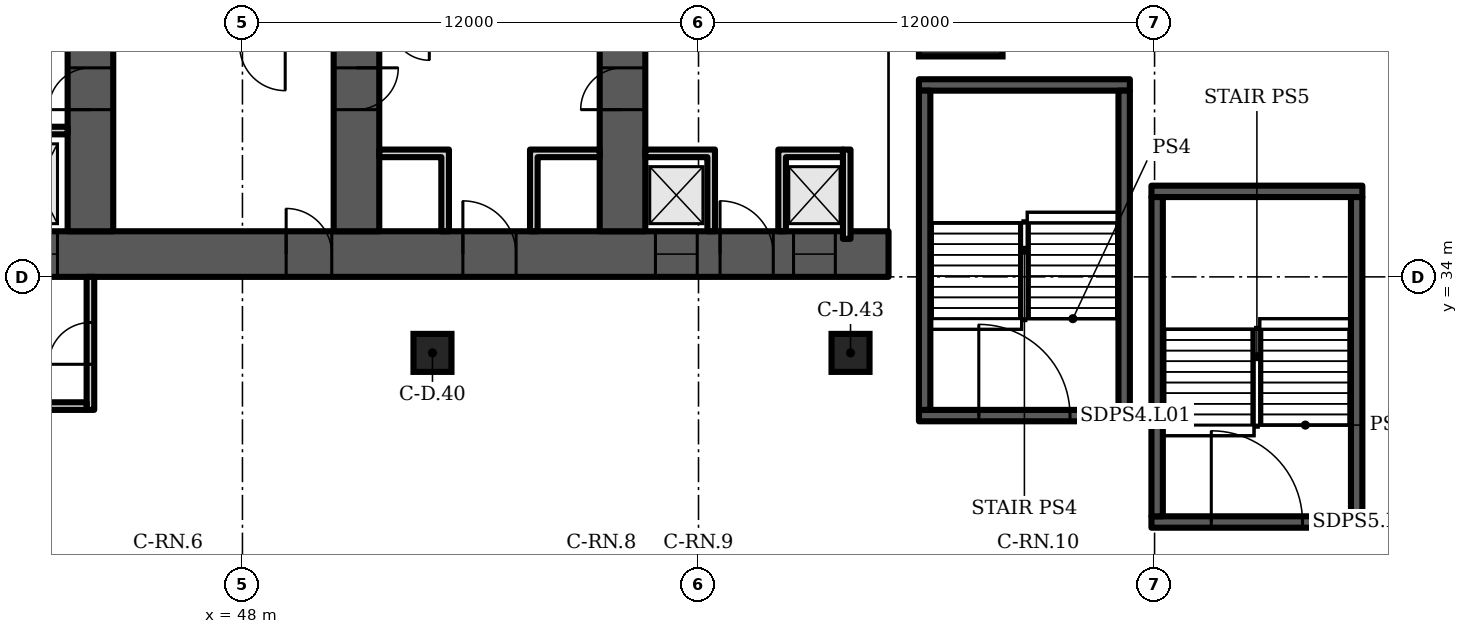
"""IFC4 building model, lengths in metres.
Left out: names, types, materials, properties, quantities, classifications, styles, units other than length and angle.
Written with IfcOpenShell. Run it as: python <this file> out.ifc"""

import sys

from ifc_helpers import new_model, si_unit, direction, frame, frame_2d, origin, origin_2d, place, context, subcontext, project, spatial, polyline, rectangle, outline, extrude, element, fill, save


model = new_model("IFC4")
c1 = context("Model", 3, precision=1e-05, world=origin(), true_north=direction((0.0, 1.0)))
c2 = subcontext(c1, "Body", "Model", "MODEL_VIEW")
j1 = project(units=[si_unit("LENGTHUNIT", "METRE"), si_unit("PLANEANGLEUNIT", "RADIAN")], contexts=[c1])
p1 = place(None, origin())
s1 = spatial("IfcSite", under=j1, at=p1, CompositionType="ELEMENT")
p2 = place(p1, origin())
s2 = spatial("IfcBuilding", under=s1, at=p2, CompositionType="ELEMENT")
p3 = place(p2, frame((0.0, 0.0, 8.0)))
s3 = spatial("IfcBuildingStorey", under=s2, at=p3, CompositionType="ELEMENT", Elevation=8.0)
p4 = place(p3, frame((66.9, 40.9, 0.0), z_axis=(0.0, 0.0, 1.0), x_axis=(1.0, 0.0, 0.0)))
e1 = element("IfcColumn", 1, at=p4, inside=s3, PredefinedType="COLUMN", context=c2, shape_type="SweptSolid", body=[
    extrude(rectangle(XDim=2.2, YDim=2.2, at=origin_2d()), origin(), (0.0, 0.0, 1.0), 7.0),
])
for number, where, z_axis, x_axis in (
    (2, (53.0, 32.0, 0.0), (0.0, 0.0, 1.0), (1.0, 0.0, 0.0)),
    (3, (64.0, 32.0, 0.0), (0.0, 0.0, 1.0), (1.0, 0.0, 0.0)),
):
    element("IfcColumn", number, at=place(p3, frame(where, z_axis=z_axis, x_axis=x_axis)), inside=s3, PredefinedType="COLUMN", context=c2, shape_type="SweptSolid", body=[
        extrude(rectangle(XDim=1.0, YDim=1.0, at=origin_2d()), origin(), (0.0, 0.0, 1.0), 7.0),
    ])
p5 = place(p3, frame((9.0, 34.6, 0.0), z_axis=(0.0, 0.0, 1.0), x_axis=(1.0, 0.0, 0.0)))
e4 = element("IfcWall", 4, at=p5, inside=s3, PredefinedType="SHEAR", context=c2, shape_type="SweptSolid", body=[
    extrude(rectangle(XDim=56.0, YDim=1.2, at=frame_2d((28.0, 0.0))), origin(), (0.0, 0.0, 1.0), 6.7),
])
p6 = place(p5, frame((2.0, 0.0, 0.0)))
e5 = element("IfcOpeningElement", 5, at=p6, cuts=e4, PredefinedType="OPENING", context=c2, shape_type="SweptSolid", body=[
    extrude(rectangle(XDim=1.0, YDim=2.1, at=frame_2d((0.5, 1.05))), frame((0.0, 0.61, 0.0), z_axis=(0.0, -1.0, 0.0), x_axis=(1.0, 0.0, 0.0)), (0.0, 0.0, 1.0), 1.22),
])
p7 = place(p5, frame((4.6, 0.0, 0.0)))
e6 = element("IfcOpeningElement", 6, at=p7, cuts=e4, PredefinedType="OPENING", context=c2, shape_type="SweptSolid", body=[
    extrude(rectangle(XDim=1.0, YDim=2.1, at=frame_2d((0.5, 1.05))), frame((0.0, 0.61, 0.0), z_axis=(0.0, -1.0, 0.0), x_axis=(1.0, 0.0, 0.0)), (0.0, 0.0, 1.0), 1.22),
])
p8 = place(p5, frame((7.867, 0.0, 0.0)))
e7 = element("IfcOpeningElement", 7, at=p8, cuts=e4, PredefinedType="OPENING", context=c2, shape_type="SweptSolid", body=[
    extrude(rectangle(XDim=1.1, YDim=2.1, at=frame_2d((0.55, 1.05))), frame((0.0, 0.61, 0.0), z_axis=(0.0, -1.0, 0.0), x_axis=(1.0, 0.0, 0.0)), (0.0, 0.0, 1.0), 1.22),
])
p9 = place(p5, frame((12.033, 0.0, 0.0)))
e8 = element("IfcOpeningElement", 8, at=p9, cuts=e4, PredefinedType="OPENING", context=c2, shape_type="SweptSolid", body=[
    extrude(rectangle(XDim=1.1, YDim=2.1, at=frame_2d((0.55, 1.05))), frame((0.0, 0.61, 0.0), z_axis=(0.0, -1.0, 0.0), x_axis=(1.0, 0.0, 0.0)), (0.0, 0.0, 1.0), 1.22),
])
p10 = place(p5, frame((9.8, 0.0, 0.0)))
e9 = element("IfcOpeningElement", 9, at=p10, cuts=e4, PredefinedType="OPENING", context=c2, shape_type="SweptSolid", body=[
    extrude(rectangle(XDim=1.4, YDim=2.1, at=frame_2d((0.7, 1.05))), frame((0.0, 0.61, 0.0), z_axis=(0.0, -1.0, 0.0), x_axis=(1.0, 0.0, 0.0)), (0.0, 0.0, 1.0), 1.22),
])
p11 = place(p5, frame((14.65, 0.0, 0.0)))
e10 = element("IfcOpeningElement", 10, at=p11, cuts=e4, PredefinedType="OPENING", context=c2, shape_type="SweptSolid", body=[
    extrude(rectangle(XDim=1.2, YDim=2.1, at=frame_2d((0.6, 1.05))), frame((0.0, 0.61, 0.0), z_axis=(0.0, -1.0, 0.0), x_axis=(1.0, 0.0, 0.0)), (0.0, 0.0, 1.0), 1.22),
])
p12 = place(p5, frame((21.867, 0.0, 0.0)))
e11 = element("IfcOpeningElement", 11, at=p12, cuts=e4, PredefinedType="OPENING", context=c2, shape_type="SweptSolid", body=[
    extrude(rectangle(XDim=1.1, YDim=2.1, at=frame_2d((0.55, 1.05))), frame((0.0, 0.61, 0.0), z_axis=(0.0, -1.0, 0.0), x_axis=(1.0, 0.0, 0.0)), (0.0, 0.0, 1.0), 1.22),
])
p13 = place(p5, frame((26.033, 0.0, 0.0)))
e12 = element("IfcOpeningElement", 12, at=p13, cuts=e4, PredefinedType="OPENING", context=c2, shape_type="SweptSolid", body=[
    extrude(rectangle(XDim=1.1, YDim=2.1, at=frame_2d((0.55, 1.05))), frame((0.0, 0.61, 0.0), z_axis=(0.0, -1.0, 0.0), x_axis=(1.0, 0.0, 0.0)), (0.0, 0.0, 1.0), 1.22),
])
p14 = place(p5, frame((23.8, 0.0, 0.0)))
e13 = element("IfcOpeningElement", 13, at=p14, cuts=e4, PredefinedType="OPENING", context=c2, shape_type="SweptSolid", body=[
    extrude(rectangle(XDim=1.4, YDim=2.1, at=frame_2d((0.7, 1.05))), frame((0.0, 0.61, 0.0), z_axis=(0.0, -1.0, 0.0), x_axis=(1.0, 0.0, 0.0)), (0.0, 0.0, 1.0), 1.22),
])
p15 = place(p5, frame((28.867, 0.0, 0.0)))
e14 = element("IfcOpeningElement", 14, at=p15, cuts=e4, PredefinedType="OPENING", context=c2, shape_type="SweptSolid", body=[
    extrude(rectangle(XDim=1.1, YDim=2.1, at=frame_2d((0.55, 1.05))), frame((0.0, 0.61, 0.0), z_axis=(0.0, -1.0, 0.0), x_axis=(1.0, 0.0, 0.0)), (0.0, 0.0, 1.0), 1.22),
])
p16 = place(p5, frame((33.033, 0.0, 0.0)))
e15 = element("IfcOpeningElement", 15, at=p16, cuts=e4, PredefinedType="OPENING", context=c2, shape_type="SweptSolid", body=[
    extrude(rectangle(XDim=1.1, YDim=2.1, at=frame_2d((0.55, 1.05))), frame((0.0, 0.61, 0.0), z_axis=(0.0, -1.0, 0.0), x_axis=(1.0, 0.0, 0.0)), (0.0, 0.0, 1.0), 1.22),
])
p17 = place(p5, frame((40.15, 0.0, 0.0)))
e16 = element("IfcOpeningElement", 16, at=p17, cuts=e4, PredefinedType="OPENING", context=c2, shape_type="SweptSolid", body=[
    extrude(rectangle(XDim=1.2, YDim=2.1, at=frame_2d((0.6, 1.05))), frame((0.0, 0.61, 0.0), z_axis=(0.0, -1.0, 0.0), x_axis=(1.0, 0.0, 0.0)), (0.0, 0.0, 1.0), 1.22),
])
p18 = place(p5, frame((44.8, 0.0, 0.0)))
e17 = element("IfcOpeningElement", 17, at=p18, cuts=e4, PredefinedType="OPENING", context=c2, shape_type="SweptSolid", body=[
    extrude(rectangle(XDim=1.4, YDim=2.1, at=frame_2d((0.7, 1.05))), frame((0.0, 0.61, 0.0), z_axis=(0.0, -1.0, 0.0), x_axis=(1.0, 0.0, 0.0)), (0.0, 0.0, 1.0), 1.22),
])
p19 = place(p5, frame((49.867, 0.0, 0.0)))
e18 = element("IfcOpeningElement", 18, at=p19, cuts=e4, PredefinedType="OPENING", context=c2, shape_type="SweptSolid", body=[
    extrude(rectangle(XDim=1.1, YDim=2.1, at=frame_2d((0.55, 1.05))), frame((0.0, 0.61, 0.0), z_axis=(0.0, -1.0, 0.0), x_axis=(1.0, 0.0, 0.0)), (0.0, 0.0, 1.0), 1.22),
])
p20 = place(p5, frame((53.5, 0.0, 0.0)))
e19 = element("IfcOpeningElement", 19, at=p20, cuts=e4, PredefinedType="OPENING", context=c2, shape_type="SweptSolid", body=[
    extrude(rectangle(XDim=1.1, YDim=2.1, at=frame_2d((0.55, 1.05))), frame((0.0, 0.61, 0.0), z_axis=(0.0, -1.0, 0.0), x_axis=(1.0, 0.0, 0.0)), (0.0, 0.0, 1.0), 1.22),
])
p21 = place(p5, frame((51.567, 0.0, 0.0)))
e20 = element("IfcOpeningElement", 20, at=p21, cuts=e4, PredefinedType="OPENING", context=c2, shape_type="SweptSolid", body=[
    extrude(rectangle(XDim=1.4, YDim=2.1, at=frame_2d((0.7, 1.05))), frame((0.0, 0.61, 0.0), z_axis=(0.0, -1.0, 0.0), x_axis=(1.0, 0.0, 0.0)), (0.0, 0.0, 1.0), 1.22),
])
p22 = place(p3, frame((44.0, 35.2, 0.0), z_axis=(0.0, 0.0, 1.0), x_axis=(0.0, 1.0, 0.0)))
e21 = element("IfcWall", 21, at=p22, inside=s3, PredefinedType="SHEAR", context=c2, shape_type="SweptSolid", body=[
    extrude(rectangle(XDim=12.8, YDim=1.2, at=frame_2d((6.4, 0.0))), origin(), (0.0, 0.0, 1.0), 6.7),
])
p23 = place(p22, frame((3.2, 0.0, 0.0)))
e22 = element("IfcOpeningElement", 22, at=p23, cuts=e21, PredefinedType="OPENING", context=c2, shape_type="SweptSolid", body=[
    extrude(rectangle(XDim=1.1, YDim=2.1, at=frame_2d((0.55, 1.05))), frame((0.0, 0.61, 0.0), z_axis=(0.0, -1.0, 0.0), x_axis=(1.0, 0.0, 0.0)), (0.0, 0.0, 1.0), 1.22),
])
p24 = place(p22, frame((9.6, 0.0, 0.0)))
e23 = element("IfcOpeningElement", 23, at=p24, cuts=e21, PredefinedType="OPENING", context=c2, shape_type="SweptSolid", body=[
    extrude(rectangle(XDim=1.0, YDim=2.1, at=frame_2d((0.5, 1.05))), frame((0.0, 0.61, 0.0), z_axis=(0.0, -1.0, 0.0), x_axis=(1.0, 0.0, 0.0)), (0.0, 0.0, 1.0), 1.22),
])
p25 = place(p3, frame((51.0, 35.2, 0.0), z_axis=(0.0, 0.0, 1.0), x_axis=(0.0, 1.0, 0.0)))
e24 = element("IfcWall", 24, at=p25, inside=s3, PredefinedType="SHEAR", context=c2, shape_type="SweptSolid", body=[
    extrude(rectangle(XDim=12.8, YDim=1.2, at=frame_2d((6.4, 0.0))), origin(), (0.0, 0.0, 1.0), 6.7),
])
p26 = place(p25, frame((3.2, 0.0, 0.0)))
e25 = element("IfcOpeningElement", 25, at=p26, cuts=e24, PredefinedType="OPENING", context=c2, shape_type="SweptSolid", body=[
    extrude(rectangle(XDim=1.1, YDim=2.1, at=frame_2d((0.55, 1.05))), frame((0.0, 0.61, 0.0), z_axis=(0.0, -1.0, 0.0), x_axis=(1.0, 0.0, 0.0)), (0.0, 0.0, 1.0), 1.22),
])
p27 = place(p3, frame((58.0, 35.2, 0.0), z_axis=(0.0, 0.0, 1.0), x_axis=(0.0, 1.0, 0.0)))
e26 = element("IfcWall", 26, at=p27, inside=s3, PredefinedType="SHEAR", context=c2, shape_type="SweptSolid", body=[
    extrude(rectangle(XDim=12.8, YDim=1.2, at=frame_2d((6.4, 0.0))), origin(), (0.0, 0.0, 1.0), 6.7),
])
p28 = place(p27, frame((10.134, 0.0, 0.0)))
e27 = element("IfcOpeningElement", 27, at=p28, cuts=e26, PredefinedType="OPENING", context=c2, shape_type="SweptSolid", body=[
    extrude(rectangle(XDim=1.0, YDim=2.1, at=frame_2d((0.5, 1.05))), frame((0.0, 0.61, 0.0), z_axis=(0.0, -1.0, 0.0), x_axis=(1.0, 0.0, 0.0)), (0.0, 0.0, 1.0), 1.22),
])
p29 = place(p27, frame((3.2, 0.0, 0.0)))
e28 = element("IfcOpeningElement", 28, at=p29, cuts=e26, PredefinedType="OPENING", context=c2, shape_type="SweptSolid", body=[
    extrude(rectangle(XDim=1.1, YDim=2.1, at=frame_2d((0.55, 1.05))), frame((0.0, 0.61, 0.0), z_axis=(0.0, -1.0, 0.0), x_axis=(1.0, 0.0, 0.0)), (0.0, 0.0, 1.0), 1.22),
])
p30 = place(p3, frame((0.0, 0.0, -0.0)))
e29 = element("IfcWall", 29, at=p30, inside=s3, PredefinedType="PARTITIONING", context=c2, shape_type="SweptSolid", body=[
    extrude(outline(polyline([(41.567, 37.95), (41.767, 37.95), (43.4, 37.95), (43.4, 37.75), (41.767, 37.75), (41.767, 35.2), (41.567, 35.2), (41.567, 37.95)])), origin(), (0.0, 0.0, 1.0), 6.7),
])
p31 = place(p3, frame((0.0, 0.0, -0.0)))
e30 = element("IfcWall", 30, at=p31, inside=s3, PredefinedType="PARTITIONING", context=c2, shape_type="SweptSolid", body=[
    extrude(outline(polyline([(53.233, 37.15), (51.6, 37.15), (51.6, 37.35), (53.233, 37.35), (53.433, 37.35), (53.433, 35.2), (53.233, 35.2), (53.233, 37.15)])), origin(), (0.0, 0.0, 1.0), 6.7),
])
p32 = place(p3, frame((0.0, 0.0, -0.0)))
e31 = element("IfcWall", 31, at=p32, inside=s3, PredefinedType="PARTITIONING", context=c2, shape_type="SweptSolid", body=[
    extrude(outline(polyline([(55.567, 37.35), (55.767, 37.35), (57.4, 37.35), (57.4, 37.15), (55.767, 37.15), (55.767, 35.2), (55.567, 35.2), (55.567, 37.35)])), origin(), (0.0, 0.0, 1.0), 6.7),
])
p33 = place(p3, frame((0.0, 0.0, -0.0)))
e32 = element("IfcWall", 32, at=p33, inside=s3, PredefinedType="PARTITIONING", context=c2, shape_type="SweptSolid", body=[
    extrude(outline(polyline([(60.233, 37.15), (58.6, 37.15), (58.6, 37.35), (60.233, 37.35), (60.433, 37.35), (60.433, 35.2), (60.233, 35.2), (60.233, 37.15)])), origin(), (0.0, 0.0, 1.0), 6.7),
])
p34 = place(p3, frame((0.0, 0.0, -0.0)))
e33 = element("IfcWall", 33, at=p34, inside=s3, PredefinedType="PARTITIONING", context=c2, shape_type="SweptSolid", body=[
    extrude(outline(polyline([(62.1, 37.35), (62.3, 37.35), (63.8, 37.35), (63.8, 37.15), (62.3, 37.15), (62.3, 35.2), (62.1, 35.2), (62.1, 37.35)])), origin(), (0.0, 0.0, 1.0), 6.7),
])
p35 = place(p3, frame((63.9, 35.0, 0.0), z_axis=(0.0, 0.0, 1.0), x_axis=(0.0, 1.0, 0.0)))
e34 = element("IfcWall", 34, at=p35, inside=s3, PredefinedType="PARTITIONING", context=c2, shape_type="SweptSolid", body=[
    extrude(rectangle(XDim=2.35, YDim=0.2, at=frame_2d((1.175, 0.0))), origin(), (0.0, 0.0, 1.0), 6.7),
])
p36 = place(p3, frame((44.0, 30.5, 0.0), z_axis=(0.0, 0.0, 1.0), x_axis=(0.0, 1.0, 0.0)))
e35 = element("IfcWall", 35, at=p36, inside=s3, PredefinedType="PARTITIONING", context=c2, shape_type="SweptSolid", body=[
    extrude(rectangle(XDim=3.5, YDim=0.2, at=frame_2d((1.75, 0.0))), origin(), (0.0, 0.0, 1.0), 6.7),
])
p37 = place(p36, frame((1.2, 0.0, 0.0)))
e36 = element("IfcOpeningElement", 36, at=p37, cuts=e35, PredefinedType="OPENING", context=c2, shape_type="SweptSolid", body=[
    extrude(rectangle(XDim=1.1, YDim=2.1, at=frame_2d((0.55, 1.05))), frame((0.0, 0.11, 0.0), z_axis=(0.0, -1.0, 0.0), x_axis=(1.0, 0.0, 0.0)), (0.0, 0.0, 1.0), 0.22),
])
p38 = place(p3, frame((41.1, 30.6, 0.0), z_axis=(0.0, 0.0, 1.0), x_axis=(1.0, 0.0, 0.0)))
e37 = element("IfcWall", 37, at=p38, inside=s3, PredefinedType="PARTITIONING", context=c2, shape_type="SweptSolid", body=[
    extrude(rectangle(XDim=2.8, YDim=0.2, at=frame_2d((1.4, 0.0))), origin(), (0.0, 0.0, 1.0), 6.7),
])
p39 = place(p3, frame((65.8, 30.35, 0.0), z_axis=(0.0, 0.0, 1.0), x_axis=(1.0, 0.0, 0.0)))
e38 = element("IfcWall", 38, at=p39, inside=s3, PredefinedType="SHEAR", context=c2, shape_type="SweptSolid", body=[
    extrude(rectangle(XDim=5.55, YDim=0.3, at=frame_2d((2.775, 0.0))), origin(), (0.0, 0.0, 1.0), 6.7),
])
p40 = place(p39, frame((1.575, 0.0, 0.0)))
e39 = element("IfcOpeningElement", 39, at=p40, cuts=e38, PredefinedType="OPENING", context=c2, shape_type="SweptSolid", body=[
    extrude(rectangle(XDim=2.4, YDim=2.1, at=frame_2d((1.2, 1.05))), frame((0.0, 0.16, 0.0), z_axis=(0.0, -1.0, 0.0), x_axis=(1.0, 0.0, 0.0)), (0.0, 0.0, 1.0), 0.32),
])
p41 = place(p3, frame((65.8, 39.05, 0.0), z_axis=(0.0, 0.0, 1.0), x_axis=(1.0, 0.0, 0.0)))
e40 = element("IfcWall", 40, at=p41, inside=s3, PredefinedType="SHEAR", context=c2, shape_type="SweptSolid", body=[
    extrude(rectangle(XDim=5.55, YDim=0.3, at=frame_2d((2.775, 0.0))), origin(), (0.0, 0.0, 1.0), 6.7),
])
for number, where, z_axis, x_axis in (
    (41, (65.95, 30.5, 0.0), (0.0, 0.0, 1.0), (0.0, 1.0, 0.0)),
    (42, (71.2, 30.5, 0.0), (0.0, 0.0, 1.0), (0.0, 1.0, 0.0)),
):
    element("IfcWall", number, at=place(p3, frame(where, z_axis=z_axis, x_axis=x_axis)), inside=s3, PredefinedType="SHEAR", context=c2, shape_type="SweptSolid", body=[
        extrude(rectangle(XDim=8.4, YDim=0.3, at=frame_2d((4.2, 0.0))), origin(), (0.0, 0.0, 1.0), 6.7),
    ])
p42 = place(p3, frame((71.917, 27.55, 0.0), z_axis=(0.0, 0.0, 1.0), x_axis=(1.0, 0.0, 0.0)))
e43 = element("IfcWall", 43, at=p42, inside=s3, PredefinedType="SHEAR", context=c2, shape_type="SweptSolid", body=[
    extrude(rectangle(XDim=5.55, YDim=0.3, at=frame_2d((2.775, 0.0))), origin(), (0.0, 0.0, 1.0), 6.7),
])
p43 = place(p42, frame((1.575, 0.0, 0.0)))
e44 = element("IfcOpeningElement", 44, at=p43, cuts=e43, PredefinedType="OPENING", context=c2, shape_type="SweptSolid", body=[
    extrude(rectangle(XDim=2.4, YDim=2.1, at=frame_2d((1.2, 1.05))), frame((0.0, 0.16, 0.0), z_axis=(0.0, -1.0, 0.0), x_axis=(1.0, 0.0, 0.0)), (0.0, 0.0, 1.0), 0.32),
])
p44 = place(p3, frame((71.917, 36.25, 0.0), z_axis=(0.0, 0.0, 1.0), x_axis=(1.0, 0.0, 0.0)))
e45 = element("IfcWall", 45, at=p44, inside=s3, PredefinedType="SHEAR", context=c2, shape_type="SweptSolid", body=[
    extrude(rectangle(XDim=5.55, YDim=0.3, at=frame_2d((2.775, 0.0))), origin(), (0.0, 0.0, 1.0), 6.7),
])
for number, where, z_axis, x_axis in (
    (46, (72.067, 27.7, 0.0), (0.0, 0.0, 1.0), (0.0, 1.0, 0.0)),
    (47, (77.317, 27.7, 0.0), (0.0, 0.0, 1.0), (0.0, 1.0, 0.0)),
):
    element("IfcWall", number, at=place(p3, frame(where, z_axis=z_axis, x_axis=x_axis)), inside=s3, PredefinedType="SHEAR", context=c2, shape_type="SweptSolid", body=[
        extrude(rectangle(XDim=8.4, YDim=0.3, at=frame_2d((4.2, 0.0))), origin(), (0.0, 0.0, 1.0), 6.7),
    ])
p45 = place(p16, origin())
e48 = element("IfcDoor", 48, at=p45, inside=s3, OperationType="DOUBLE_DOOR_SLIDING", PredefinedType="DOOR", context=c2, shape_type="SweptSolid", body=[
    extrude(rectangle(XDim=1.1, YDim=2.1, at=frame_2d((0.55, 1.05))), frame((0.0, 0.025, 0.0), z_axis=(0.0, -1.0, 0.0), x_axis=(1.0, 0.0, 0.0)), (0.0, 0.0, 1.0), 0.05),
])
fill(e15, e48)
p46 = place(p17, origin())
e49 = element("IfcDoor", 49, at=p46, inside=s3, OperationType="SINGLE_SWING_LEFT", PredefinedType="DOOR", context=c2, shape_type="SweptSolid", body=[
    extrude(rectangle(XDim=1.2, YDim=2.1, at=frame_2d((0.6, 1.05))), frame((0.0, 0.025, 0.0), z_axis=(0.0, -1.0, 0.0), x_axis=(1.0, 0.0, 0.0)), (0.0, 0.0, 1.0), 0.05),
])
fill(e16, e49)
p47 = place(p18, origin())
e50 = element("IfcDoor", 50, at=p47, inside=s3, OperationType="DOUBLE_DOOR_SINGLE_SWING", PredefinedType="DOOR", context=c2, shape_type="SweptSolid", body=[
    extrude(rectangle(XDim=1.4, YDim=2.1, at=frame_2d((0.7, 1.05))), frame((0.0, 0.025, 0.0), z_axis=(0.0, -1.0, 0.0), x_axis=(1.0, 0.0, 0.0)), (0.0, 0.0, 1.0), 0.05),
])
fill(e17, e50)
p48 = place(p19, origin())
e51 = element("IfcDoor", 51, at=p48, inside=s3, OperationType="DOUBLE_DOOR_SLIDING", PredefinedType="DOOR", context=c2, shape_type="SweptSolid", body=[
    extrude(rectangle(XDim=1.1, YDim=2.1, at=frame_2d((0.55, 1.05))), frame((0.0, 0.025, 0.0), z_axis=(0.0, -1.0, 0.0), x_axis=(1.0, 0.0, 0.0)), (0.0, 0.0, 1.0), 0.05),
])
fill(e18, e51)
p49 = place(p20, origin())
e52 = element("IfcDoor", 52, at=p49, inside=s3, OperationType="DOUBLE_DOOR_SLIDING", PredefinedType="DOOR", context=c2, shape_type="SweptSolid", body=[
    extrude(rectangle(XDim=1.1, YDim=2.1, at=frame_2d((0.55, 1.05))), frame((0.0, 0.025, 0.0), z_axis=(0.0, -1.0, 0.0), x_axis=(1.0, 0.0, 0.0)), (0.0, 0.0, 1.0), 0.05),
])
fill(e19, e52)
p50 = place(p21, origin())
e53 = element("IfcDoor", 53, at=p50, inside=s3, OperationType="DOUBLE_DOOR_SINGLE_SWING", PredefinedType="DOOR", context=c2, shape_type="SweptSolid", body=[
    extrude(rectangle(XDim=1.4, YDim=2.1, at=frame_2d((0.7, 1.05))), frame((0.0, 0.025, 0.0), z_axis=(0.0, -1.0, 0.0), x_axis=(1.0, 0.0, 0.0)), (0.0, 0.0, 1.0), 0.05),
])
fill(e20, e53)
p51 = place(p23, origin())
e54 = element("IfcDoor", 54, at=p51, inside=s3, OperationType="SINGLE_SWING_LEFT", PredefinedType="DOOR", context=c2, shape_type="SweptSolid", body=[
    extrude(rectangle(XDim=1.1, YDim=2.1, at=frame_2d((0.55, 1.05))), frame((0.0, 0.025, 0.0), z_axis=(0.0, -1.0, 0.0), x_axis=(1.0, 0.0, 0.0)), (0.0, 0.0, 1.0), 0.05),
])
fill(e22, e54)
p52 = place(p26, origin())
e55 = element("IfcDoor", 55, at=p52, inside=s3, OperationType="SINGLE_SWING_RIGHT", PredefinedType="DOOR", context=c2, shape_type="SweptSolid", body=[
    extrude(rectangle(XDim=1.1, YDim=2.1, at=frame_2d((0.55, 1.05))), frame((0.0, 0.025, 0.0), z_axis=(0.0, -1.0, 0.0), x_axis=(1.0, 0.0, 0.0)), (0.0, 0.0, 1.0), 0.05),
])
fill(e25, e55)
p53 = place(p29, origin())
e56 = element("IfcDoor", 56, at=p53, inside=s3, OperationType="SINGLE_SWING_LEFT", PredefinedType="DOOR", context=c2, shape_type="SweptSolid", body=[
    extrude(rectangle(XDim=1.1, YDim=2.1, at=frame_2d((0.55, 1.05))), frame((0.0, 0.025, 0.0), z_axis=(0.0, -1.0, 0.0), x_axis=(1.0, 0.0, 0.0)), (0.0, 0.0, 1.0), 0.05),
])
fill(e28, e56)
p54 = place(p37, origin())
e57 = element("IfcDoor", 57, at=p54, inside=s3, OperationType="SINGLE_SWING_LEFT", PredefinedType="DOOR", context=c2, shape_type="SweptSolid", body=[
    extrude(rectangle(XDim=1.1, YDim=2.1, at=frame_2d((0.55, 1.05))), frame((0.0, 0.025, 0.0), z_axis=(0.0, -1.0, 0.0), x_axis=(1.0, 0.0, 0.0)), (0.0, 0.0, 1.0), 0.05),
])
fill(e36, e57)
p55 = place(p40, origin())
e58 = element("IfcDoor", 58, at=p55, inside=s3, OperationType="DOUBLE_DOOR_SINGLE_SWING", PredefinedType="DOOR", context=c2, shape_type="SweptSolid", body=[
    extrude(rectangle(XDim=2.4, YDim=2.1, at=frame_2d((1.2, 1.05))), frame((0.0, 0.025, 0.0), z_axis=(0.0, -1.0, 0.0), x_axis=(1.0, 0.0, 0.0)), (0.0, 0.0, 1.0), 0.05),
])
fill(e39, e58)
p56 = place(p43, origin())
e59 = element("IfcDoor", 59, at=p56, inside=s3, OperationType="DOUBLE_DOOR_SINGLE_SWING", PredefinedType="DOOR", context=c2, shape_type="SweptSolid", body=[
    extrude(rectangle(XDim=2.4, YDim=2.1, at=frame_2d((1.2, 1.05))), frame((0.0, 0.025, 0.0), z_axis=(0.0, -1.0, 0.0), x_axis=(1.0, 0.0, 0.0)), (0.0, 0.0, 1.0), 0.05),
])
fill(e44, e59)
save(model, sys.argv[1])
